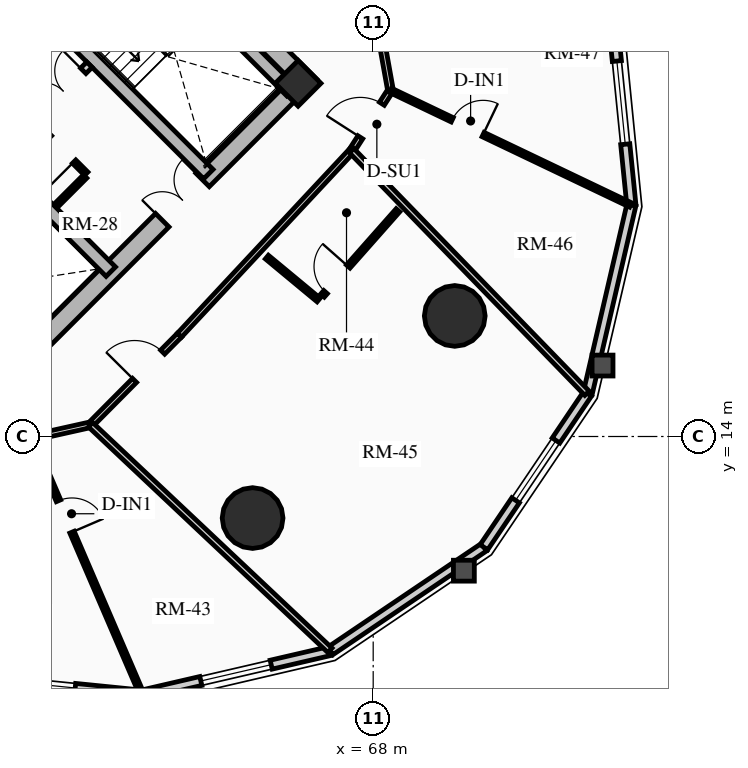
"""IFC4 building model, lengths in metres.
Left out: names, types, materials, properties, quantities, classifications, styles, units other than length and angle.
Written with IfcOpenShell. Run it as: python <this file> out.ifc"""

import sys

from ifc_helpers import new_model, si_unit, direction, frame, frame_2d, origin, origin_2d, place, context, subcontext, project, spatial, rectangle, circle, extrude, source, transform, mapped, element, fill, save


model = new_model("IFC4")
c1 = context("Model", 3, precision=1e-05, world=origin(), true_north=direction((0.0, 1.0)))
c2 = subcontext(c1, "Body", "Model", "MODEL_VIEW")
j1 = project(units=[si_unit("LENGTHUNIT", "METRE"), si_unit("PLANEANGLEUNIT", "RADIAN")], contexts=[c1])
p1 = place(None, origin())
s1 = spatial("IfcSite", under=j1, at=p1, CompositionType="ELEMENT")
p2 = place(p1, origin())
s2 = spatial("IfcBuilding", under=s1, at=p2, CompositionType="ELEMENT")
p3 = place(p2, frame((0.0, 0.0, 36.55)))
s3 = spatial("IfcBuildingStorey", under=s2, at=p3, CompositionType="ELEMENT", Elevation=36.55)
p4 = place(p3, frame((66.339, 23.227, 0.0), z_axis=(0.0, 0.0, 1.0), x_axis=(-0.707106781187, 0.707106781187, 0.0)))
e1 = element("IfcWall", 1, at=p4, inside=s3, PredefinedType="SHEAR", context=c2, shape_type="SweptSolid", body=[
    extrude(rectangle(XDim=14.3, YDim=0.5, at=frame_2d((7.15, 0.0))), origin(), (0.0, 0.0, 1.0), 2.91),
])
p5 = place(p3, frame((58.596, 15.838, 0.0), z_axis=(0.0, 0.0, 1.0), x_axis=(0.707106781187, 0.707106781187, 0.0)))
e2 = element("IfcWall", 2, at=p5, inside=s3, PredefinedType="SHEAR", context=c2, shape_type="SweptSolid", body=[
    extrude(rectangle(XDim=10.7, YDim=0.5, at=frame_2d((5.35, 0.0))), origin(), (0.0, 0.0, 1.0), 2.91),
])
m1 = source(origin(), c2, "Body", "SweptSolid", [
    extrude(rectangle(XDim=1.5, YDim=2.02, at=frame_2d((0.75, 1.01))), frame((0.0, 0.26, 0.0), z_axis=(0.0, -1.0, 0.0), x_axis=(1.0, 0.0, 0.0)), (0.0, 0.0, 1.0), 0.52),
])
p6 = place(p5, frame((5.45, 0.0, 0.0)))
e3 = element("IfcOpeningElement", 3, at=p6, cuts=e2, PredefinedType="OPENING", context=c2, shape_type="MappedRepresentation", body=[
    mapped(m1, transform((0.0, 0.0, 0.0), x_axis=(1.0, 0.0, 0.0), y_axis=(0.0, 1.0, 0.0), z_axis=(0.0, 0.0, 1.0), scale=1.0)),
])
p7 = place(p3, frame((61.096, 18.338, 0.0), z_axis=(0.0, 0.0, 1.0), x_axis=(-0.707106781187, 0.707106781187, 0.0)))
e4 = element("IfcWall", 4, at=p7, inside=s3, PredefinedType="SHEAR", context=c2, shape_type="SweptSolid", body=[
    extrude(rectangle(XDim=13.8, YDim=0.35, at=frame_2d((6.9, 0.0))), origin(), (0.0, 0.0, 1.0), 2.91),
])
m2 = source(origin(), c2, "Body", "SweptSolid", [
    extrude(rectangle(XDim=1.1, YDim=2.015, at=frame_2d((0.55, 1.007))), frame((0.0, 0.185, 0.0), z_axis=(0.0, -1.0, 0.0), x_axis=(1.0, 0.0, 0.0)), (0.0, 0.0, 1.0), 0.37),
])
p8 = place(p7, frame((4.9, 0.0, 0.0)))
e5 = element("IfcOpeningElement", 5, at=p8, cuts=e4, PredefinedType="OPENING", context=c2, shape_type="MappedRepresentation", body=[
    mapped(m2, transform((0.0, 0.0, 0.0), x_axis=(1.0, 0.0, 0.0), y_axis=(0.0, 1.0, 0.0), z_axis=(0.0, 0.0, 1.0), scale=1.0)),
])
m3 = source(origin(), c2, "Body", "SweptSolid", [
    extrude(rectangle(XDim=1.15, YDim=2.02, at=frame_2d((0.575, 1.01))), frame((0.0, 0.185, 0.0), z_axis=(0.0, -1.0, 0.0), x_axis=(1.0, 0.0, 0.0)), (0.0, 0.0, 1.0), 0.37),
])
p9 = place(p7, frame((7.32, 0.0, 0.0)))
e6 = element("IfcOpeningElement", 6, at=p9, cuts=e4, PredefinedType="OPENING", context=c2, shape_type="MappedRepresentation", body=[
    mapped(m3, transform((0.0, 0.0, 0.0), x_axis=(1.0, 0.0, 0.0), y_axis=(0.0, 1.0, 0.0), z_axis=(0.0, 0.0, 1.0), scale=1.0)),
])
p10 = place(p3, frame((63.662, 20.904, 0.0), z_axis=(0.0, 0.0, 1.0), x_axis=(-0.707106781187, 0.707106781187, 0.0)))
e7 = element("IfcWall", 7, at=p10, inside=s3, PredefinedType="SHEAR", context=c2, shape_type="SweptSolid", body=[
    extrude(rectangle(XDim=13.8, YDim=0.35, at=frame_2d((6.9, 0.0))), origin(), (0.0, 0.0, 1.0), 2.91),
])
p11 = place(p10, frame((10.025, 0.0, 0.0)))
e8 = element("IfcOpeningElement", 8, at=p11, cuts=e7, PredefinedType="OPENING", context=c2, shape_type="MappedRepresentation", body=[
    mapped(m2, transform((0.0, 0.0, 0.0), x_axis=(1.0, 0.0, 0.0), y_axis=(0.0, 1.0, 0.0), z_axis=(0.0, 0.0, 1.0), scale=1.0)),
])
p12 = place(p10, frame((12.025, 0.0, 0.0)))
e9 = element("IfcOpeningElement", 9, at=p12, cuts=e7, PredefinedType="OPENING", context=c2, shape_type="MappedRepresentation", body=[
    mapped(m2, transform((0.0, 0.0, 0.0), x_axis=(1.0, 0.0, 0.0), y_axis=(0.0, 1.0, 0.0), z_axis=(0.0, 0.0, 1.0), scale=1.0)),
])
p13 = place(p10, frame((5.33, 0.0, 0.0)))
e10 = element("IfcOpeningElement", 10, at=p13, cuts=e7, PredefinedType="OPENING", context=c2, shape_type="MappedRepresentation", body=[
    mapped(m3, transform((0.0, 0.0, 0.0), x_axis=(1.0, 0.0, 0.0), y_axis=(0.0, 1.0, 0.0), z_axis=(0.0, 0.0, 1.0), scale=1.0)),
])
p14 = place(p3, frame((65.847, 23.089, 0.0), z_axis=(0.0, 0.0, 1.0), x_axis=(-0.707106781187, 0.707106781187, 0.0)))
e11 = element("IfcWall", 11, at=p14, inside=s3, PredefinedType="SHEAR", context=c2, shape_type="SweptSolid", body=[
    extrude(rectangle(XDim=6.745, YDim=0.35, at=frame_2d((3.373, 0.0))), origin(), (0.0, 0.0, 1.0), 2.91),
])
p15 = place(p3, frame((66.024, 23.294, 0.0), z_axis=(0.0, 0.0, 1.0), x_axis=(0.707106781187, 0.707106781187, 0.0)))
e12 = element("IfcColumn", 12, at=p15, inside=s3, PredefinedType="COLUMN", context=c2, shape_type="SweptSolid", body=[
    extrude(rectangle(XDim=0.85, YDim=0.85, at=origin_2d()), origin(), (0.0, 0.0, 1.0), 2.91),
])
for number, where, z_axis, x_axis in (
    (13, (64.827, 11.854, 0.0), (0.0, 0.0, 1.0), (1.0, 0.0, 0.0)),
    (14, (70.146, 17.173, 0.0), (0.0, 0.0, 1.0), (1.0, 0.0, 0.0)),
):
    element("IfcColumn", number, at=place(p3, frame(where, z_axis=z_axis, x_axis=x_axis)), inside=s3, PredefinedType="USERDEFINED", context=c2, shape_type="SweptSolid", body=[
        extrude(circle(Radius=0.8, at=origin_2d()), origin(), (0.0, 0.0, 1.0), 2.91),
    ])
p16 = place(p3, frame((61.91, 7.206, 0.0), z_axis=(0.0, 0.0, 1.0), x_axis=(-0.994968263437, 0.100190592135, 0.0)))
e15 = element("IfcWall", 15, at=p16, inside=s3, PredefinedType="SOLIDWALL", context=c2, shape_type="SweptSolid", body=[
    extrude(rectangle(XDim=5.419, YDim=0.24, at=frame_2d((2.71, 0.0))), origin(), (0.0, 0.0, 1.0), 2.073),
])
m4 = source(origin(), c2, "Body", "SweptSolid", [
    extrude(rectangle(XDim=1.9, YDim=1.35, at=frame_2d((0.95, 0.675))), frame((0.0, 0.13, 0.0), z_axis=(0.0, -1.0, 0.0), x_axis=(1.0, 0.0, 0.0)), (0.0, 0.0, 1.0), 0.26),
])
p17 = place(p16, frame((1.76, 0.0, 0.65)))
e16 = element("IfcOpeningElement", 16, at=p17, cuts=e15, PredefinedType="OPENING", context=c2, shape_type="MappedRepresentation", body=[
    mapped(m4, transform((0.0, 0.0, 0.0), x_axis=(1.0, 0.0, 0.0), y_axis=(0.0, 1.0, 0.0), z_axis=(0.0, 0.0, 1.0), scale=1.0)),
])
p18 = place(p3, frame((66.871, 8.356, 0.0), z_axis=(0.0, 0.0, 1.0), x_axis=(-0.974167686491, -0.22582585901, 0.0)))
e17 = element("IfcWall", 17, at=p18, inside=s3, PredefinedType="SOLIDWALL", context=c2, shape_type="SweptSolid", body=[
    extrude(rectangle(XDim=5.092, YDim=0.24, at=frame_2d((2.546, 0.0))), origin(), (0.0, 0.0, 1.0), 2.073),
])
p19 = place(p18, frame((1.596, 0.0, 0.65)))
e18 = element("IfcOpeningElement", 18, at=p19, cuts=e17, PredefinedType="OPENING", context=c2, shape_type="MappedRepresentation", body=[
    mapped(m4, transform((0.0, 0.0, 0.0), x_axis=(1.0, 0.0, 0.0), y_axis=(0.0, 1.0, 0.0), z_axis=(0.0, 0.0, 1.0), scale=1.0)),
])
p20 = place(p3, frame((70.914, 11.086, 0.0), z_axis=(0.0, 0.0, 1.0), x_axis=(-0.828748297084, -0.559621532896, 0.0)))
e19 = element("IfcWall", 19, at=p20, inside=s3, PredefinedType="SOLIDWALL", context=c2, shape_type="SweptSolid", body=[
    extrude(rectangle(XDim=4.879, YDim=0.24, at=frame_2d((2.439, 0.0))), origin(), (0.0, 0.0, 1.0), 2.073),
])
p21 = place(p3, frame((73.644, 15.129, 0.0), z_axis=(0.0, 0.0, 1.0), x_axis=(-0.559621532896, -0.828748297084, 0.0)))
e20 = element("IfcWall", 20, at=p21, inside=s3, PredefinedType="SOLIDWALL", context=c2, shape_type="SweptSolid", body=[
    extrude(rectangle(XDim=4.879, YDim=0.24, at=frame_2d((2.439, 0.0))), origin(), (0.0, 0.0, 1.0), 2.073),
])
p22 = place(p21, frame((1.489, 0.0, 0.65)))
e21 = element("IfcOpeningElement", 21, at=p22, cuts=e20, PredefinedType="OPENING", context=c2, shape_type="MappedRepresentation", body=[
    mapped(m4, transform((0.0, 0.0, 0.0), x_axis=(1.0, 0.0, 0.0), y_axis=(0.0, 1.0, 0.0), z_axis=(0.0, 0.0, 1.0), scale=1.0)),
])
p23 = place(p3, frame((74.794, 20.09, 0.0), z_axis=(0.0, 0.0, 1.0), x_axis=(-0.22582585901, -0.974167686491, 0.0)))
e22 = element("IfcWall", 22, at=p23, inside=s3, PredefinedType="SOLIDWALL", context=c2, shape_type="SweptSolid", body=[
    extrude(rectangle(XDim=5.092, YDim=0.24, at=frame_2d((2.546, 0.0))), origin(), (0.0, 0.0, 1.0), 2.073),
])
p24 = place(p3, frame((74.251, 25.482, 0.0), z_axis=(0.0, 0.0, 1.0), x_axis=(0.100190592135, -0.994968263437, 0.0)))
e23 = element("IfcWall", 23, at=p24, inside=s3, PredefinedType="SOLIDWALL", context=c2, shape_type="SweptSolid", body=[
    extrude(rectangle(XDim=5.419, YDim=0.24, at=frame_2d((2.71, 0.0))), origin(), (0.0, 0.0, 1.0), 2.073),
])
m5 = source(origin(), c2, "Body", "SweptSolid", [
    extrude(rectangle(XDim=2.2, YDim=1.35, at=frame_2d((1.1, 0.675))), frame((0.0, 0.13, 0.0), z_axis=(0.0, -1.0, 0.0), x_axis=(1.0, 0.0, 0.0)), (0.0, 0.0, 1.0), 0.26),
])
p25 = place(p24, frame((1.61, 0.0, 0.65)))
e24 = element("IfcOpeningElement", 24, at=p25, cuts=e23, PredefinedType="OPENING", context=c2, shape_type="MappedRepresentation", body=[
    mapped(m5, transform((0.0, 0.0, 0.0), x_axis=(1.0, 0.0, 0.0), y_axis=(0.0, 1.0, 0.0), z_axis=(0.0, 0.0, 1.0), scale=1.0)),
])
p26 = place(p3, frame((58.214, 21.467, 0.0), z_axis=(0.0, 0.0, 1.0), x_axis=(0.707106781187, 0.707106781187, 0.0)))
e25 = element("IfcWall", 25, at=p26, inside=s3, PredefinedType="PARTITIONING", context=c2, shape_type="SweptSolid", body=[
    extrude(rectangle(XDim=3.28, YDim=0.2, at=frame_2d((1.64, 0.0))), origin(), (0.0, 0.0, 1.0), 2.635),
])
m6 = source(origin(), c2, "Body", "SweptSolid", [
    extrude(rectangle(XDim=1.5, YDim=2.02, at=frame_2d((0.75, 1.01))), frame((0.0, 0.11, 0.0), z_axis=(0.0, -1.0, 0.0), x_axis=(1.0, 0.0, 0.0)), (0.0, 0.0, 1.0), 0.22),
])
p27 = place(p26, frame((1.55, 0.0, 0.0)))
e26 = element("IfcOpeningElement", 26, at=p27, cuts=e25, PredefinedType="OPENING", context=c2, shape_type="MappedRepresentation", body=[
    mapped(m6, transform((0.0, 0.0, 0.0), x_axis=(1.0, 0.0, 0.0), y_axis=(0.0, 1.0, 0.0), z_axis=(0.0, 0.0, 1.0), scale=1.0)),
])
p28 = place(p3, frame((60.448, 20.915, 0.0), z_axis=(0.0, 0.0, 1.0), x_axis=(-0.707106781187, 0.707106781187, 0.0)))
e27 = element("IfcWall", 27, at=p28, inside=s3, PredefinedType="PARTITIONING", context=c2, shape_type="SweptSolid", body=[
    extrude(rectangle(XDim=1.87, YDim=0.125, at=frame_2d((0.935, 0.0))), origin(), (0.0, 0.0, 1.0), 2.635),
])
m7 = source(origin(), c2, "Body", "SweptSolid", [
    extrude(rectangle(XDim=0.9, YDim=2.005, at=frame_2d((0.45, 1.002))), frame((0.0, 0.073, 0.0), z_axis=(0.0, -1.0, 0.0), x_axis=(1.0, 0.0, 0.0)), (0.0, 0.0, 1.0), 0.145),
])
p29 = place(p28, frame((0.45, 0.0, 0.0)))
e28 = element("IfcOpeningElement", 28, at=p29, cuts=e27, PredefinedType="OPENING", context=c2, shape_type="MappedRepresentation", body=[
    mapped(m7, transform((0.0, 0.0, 0.0), x_axis=(1.0, 0.0, 0.0), y_axis=(0.0, 1.0, 0.0), z_axis=(0.0, 0.0, 1.0), scale=1.0)),
])
p30 = place(p3, frame((59.643, 20.066, 0.0), z_axis=(0.0, 0.0, 1.0), x_axis=(0.707106781187, 0.707106781187, 0.0)))
e29 = element("IfcWall", 29, at=p30, inside=s3, PredefinedType="PARTITIONING", context=c2, shape_type="SweptSolid", body=[
    extrude(rectangle(XDim=1.1, YDim=0.125, at=frame_2d((0.55, 0.0))), origin(), (0.0, 0.0, 1.0), 2.635),
])
p31 = place(p3, frame((59.008, 13.963, 0.0), z_axis=(0.0, 0.0, 1.0), x_axis=(0.976020856791, 0.21767702476, 0.0)))
e30 = element("IfcWall", 30, at=p31, inside=s3, PredefinedType="PARTITIONING", context=c2, shape_type="SweptSolid", body=[
    extrude(rectangle(XDim=1.593, YDim=0.15, at=frame_2d((0.796, 0.0))), origin(), (0.0, 0.0, 1.0), 2.205),
])
p32 = place(p3, frame((60.562, 14.31, 0.0), z_axis=(0.0, 0.0, 1.0), x_axis=(0.704566236161, 0.709638230975, 0.0)))
e31 = element("IfcWall", 31, at=p32, inside=s3, PredefinedType="PARTITIONING", context=c2, shape_type="SweptSolid", body=[
    extrude(rectangle(XDim=3.321, YDim=0.15, at=frame_2d((1.661, 0.0))), origin(), (0.0, 0.0, 1.0), 2.159),
])
m8 = source(origin(), c2, "Body", "SweptSolid", [
    extrude(rectangle(XDim=1.05, YDim=2.015, at=frame_2d((0.525, 1.007))), frame((0.0, 0.085, 0.0), z_axis=(0.0, -1.0, 0.0), x_axis=(1.0, 0.0, 0.0)), (0.0, 0.0, 1.0), 0.17),
])
p33 = place(p32, frame((1.643, 0.0, 0.0)))
e32 = element("IfcOpeningElement", 32, at=p33, cuts=e31, PredefinedType="OPENING", context=c2, shape_type="MappedRepresentation", body=[
    mapped(m8, transform((0.0, 0.0, 0.0), x_axis=(1.0, 0.0, 0.0), y_axis=(0.0, 1.0, 0.0), z_axis=(0.0, 0.0, 1.0), scale=1.0)),
])
p34 = place(p3, frame((62.903, 16.667, 0.0), z_axis=(0.0, 0.0, 1.0), x_axis=(0.682371947497, 0.731005147225, 0.0)))
e33 = element("IfcWall", 33, at=p34, inside=s3, PredefinedType="PARTITIONING", context=c2, shape_type="SweptSolid", body=[
    extrude(rectangle(XDim=6.642, YDim=0.15, at=frame_2d((3.321, 0.0))), origin(), (0.0, 0.0, 1.0), 2.159),
])
p35 = place(p3, frame((67.435, 21.521, 0.0), z_axis=(0.0, 0.0, 1.0), x_axis=(0.540777197838, 0.841165870859, 0.0)))
e34 = element("IfcWall", 34, at=p35, inside=s3, PredefinedType="PARTITIONING", context=c2, shape_type="SweptSolid", body=[
    extrude(rectangle(XDim=1.888, YDim=0.15, at=frame_2d((0.944, 0.0))), origin(), (0.0, 0.0, 1.0), 2.205),
])
p36 = place(p35, frame((0.419, 0.0, 0.0)))
e35 = element("IfcOpeningElement", 35, at=p36, cuts=e34, PredefinedType="OPENING", context=c2, shape_type="MappedRepresentation", body=[
    mapped(m8, transform((0.0, 0.0, 0.0), x_axis=(1.0, 0.0, 0.0), y_axis=(0.0, 1.0, 0.0), z_axis=(0.0, 0.0, 1.0), scale=1.0)),
])
p37 = place(p3, frame((68.456, 23.11, 0.0), z_axis=(0.0, 0.0, 1.0), x_axis=(-0.1772522795, 0.984165448191, 0.0)))
e36 = element("IfcWall", 36, at=p37, inside=s3, PredefinedType="PARTITIONING", context=c2, shape_type="SweptSolid", body=[
    extrude(rectangle(XDim=1.382, YDim=0.15, at=frame_2d((0.691, 0.0))), origin(), (0.0, 0.0, 1.0), 2.159),
])
p38 = place(p3, frame((60.562, 14.31, 0.0), z_axis=(0.0, 0.0, 1.0), x_axis=(0.727781661561, -0.685808904211, 0.0)))
e37 = element("IfcWall", 37, at=p38, inside=s3, PredefinedType="PARTITIONING", context=c2, shape_type="SweptSolid", body=[
    extrude(rectangle(XDim=8.655, YDim=0.16, at=frame_2d((4.328, 0.0))), origin(), (0.0, 0.0, 1.0), 2.073),
])
p39 = place(p3, frame((67.435, 21.521, 0.0), z_axis=(0.0, 0.0, 1.0), x_axis=(0.6962628802, -0.717786877601, 0.0)))
e38 = element("IfcWall", 38, at=p39, inside=s3, PredefinedType="PARTITIONING", context=c2, shape_type="SweptSolid", body=[
    extrude(rectangle(XDim=8.893, YDim=0.16, at=frame_2d((4.446, 0.0))), origin(), (0.0, 0.0, 1.0), 2.073),
])
p40 = place(p3, frame((59.008, 13.963, 0.0), z_axis=(0.0, 0.0, 1.0), x_axis=(0.395256697593, -0.918570706592, 0.0)))
e39 = element("IfcWall", 39, at=p40, inside=s3, PredefinedType="PARTITIONING", context=c2, shape_type="SweptSolid", body=[
    extrude(rectangle(XDim=7.334, YDim=0.125, at=frame_2d((3.667, 0.0))), origin(), (0.0, 0.0, 1.0), 2.073),
])
p41 = place(p40, frame((1.8, 0.0, 0.0)))
e40 = element("IfcOpeningElement", 40, at=p41, cuts=e39, PredefinedType="OPENING", context=c2, shape_type="MappedRepresentation", body=[
    mapped(m7, transform((0.0, 0.0, 0.0), x_axis=(1.0, 0.0, 0.0), y_axis=(0.0, 1.0, 0.0), z_axis=(0.0, 0.0, 1.0), scale=1.0)),
])
p42 = place(p3, frame((65.202, 18.721, 0.0), z_axis=(0.0, 0.0, 1.0), x_axis=(0.769814202386, -0.638268042287, 0.0)))
e41 = element("IfcWall", 41, at=p42, inside=s3, PredefinedType="PARTITIONING", context=c2, shape_type="SweptSolid", body=[
    extrude(rectangle(XDim=1.769, YDim=0.125, at=frame_2d((0.884, 0.0))), origin(), (0.0, 0.0, 1.0), 2.635),
])
p43 = place(p3, frame((66.667, 17.709, 0.0), z_axis=(0.0, 0.0, 1.0), x_axis=(0.662510581678, 0.749052554341, 0.0)))
e42 = element("IfcWall", 42, at=p43, inside=s3, PredefinedType="PARTITIONING", context=c2, shape_type="SweptSolid", body=[
    extrude(rectangle(XDim=2.996, YDim=0.125, at=frame_2d((1.498, 0.0))), origin(), (0.0, 0.0, 1.0), 2.159),
])
p44 = place(p43, frame((0.12, 0.0, 0.0)))
e43 = element("IfcOpeningElement", 43, at=p44, cuts=e42, PredefinedType="OPENING", context=c2, shape_type="MappedRepresentation", body=[
    mapped(m7, transform((0.0, 0.0, 0.0), x_axis=(1.0, 0.0, 0.0), y_axis=(0.0, 1.0, 0.0), z_axis=(0.0, 0.0, 1.0), scale=1.0)),
])
p45 = place(p3, frame((68.456, 23.11, 0.0), z_axis=(0.0, 0.0, 1.0), x_axis=(0.902430819297, -0.430834790125, 0.0)))
e44 = element("IfcWall", 44, at=p45, inside=s3, PredefinedType="PARTITIONING", context=c2, shape_type="SweptSolid", body=[
    extrude(rectangle(XDim=7.002, YDim=0.125, at=frame_2d((3.501, 0.0))), origin(), (0.0, 0.0, 1.0), 2.073),
])
p46 = place(p45, frame((1.8, 0.0, 0.0)))
e45 = element("IfcOpeningElement", 45, at=p46, cuts=e44, PredefinedType="OPENING", context=c2, shape_type="MappedRepresentation", body=[
    mapped(m7, transform((0.0, 0.0, 0.0), x_axis=(1.0, 0.0, 0.0), y_axis=(0.0, 1.0, 0.0), z_axis=(0.0, 0.0, 1.0), scale=1.0)),
])
m9 = source(origin(), c2, "Body", "SweptSolid", [
    extrude(rectangle(XDim=1.9, YDim=1.35, at=frame_2d((0.95, 0.675))), frame((0.0, 0.03, 0.0), z_axis=(0.0, -1.0, 0.0), x_axis=(1.0, 0.0, 0.0)), (0.0, 0.0, 1.0), 0.06),
])
p47 = place(p17, origin())
e46 = element("IfcWindow", 46, at=p47, inside=s3, PartitioningType="DOUBLE_PANEL_VERTICAL", PredefinedType="WINDOW", context=c2, shape_type="MappedRepresentation", body=[
    mapped(m9, transform((0.0, 0.0, 0.0), x_axis=(1.0, 0.0, 0.0), y_axis=(0.0, 1.0, 0.0), z_axis=(0.0, 0.0, 1.0), scale=1.0)),
])
fill(e16, e46)
p48 = place(p19, origin())
e47 = element("IfcWindow", 47, at=p48, inside=s3, PartitioningType="DOUBLE_PANEL_VERTICAL", PredefinedType="WINDOW", context=c2, shape_type="MappedRepresentation", body=[
    mapped(m9, transform((0.0, 0.0, 0.0), x_axis=(1.0, 0.0, 0.0), y_axis=(0.0, 1.0, 0.0), z_axis=(0.0, 0.0, 1.0), scale=1.0)),
])
fill(e18, e47)
p49 = place(p22, origin())
e48 = element("IfcWindow", 48, at=p49, inside=s3, PartitioningType="DOUBLE_PANEL_VERTICAL", PredefinedType="WINDOW", context=c2, shape_type="MappedRepresentation", body=[
    mapped(m9, transform((0.0, 0.0, 0.0), x_axis=(1.0, 0.0, 0.0), y_axis=(0.0, 1.0, 0.0), z_axis=(0.0, 0.0, 1.0), scale=1.0)),
])
fill(e21, e48)
m10 = source(origin(), c2, "Body", "SweptSolid", [
    extrude(rectangle(XDim=2.2, YDim=1.35, at=frame_2d((1.1, 0.675))), frame((0.0, 0.03, 0.0), z_axis=(0.0, -1.0, 0.0), x_axis=(1.0, 0.0, 0.0)), (0.0, 0.0, 1.0), 0.06),
])
p50 = place(p25, origin())
e49 = element("IfcWindow", 49, at=p50, inside=s3, PartitioningType="DOUBLE_PANEL_VERTICAL", PredefinedType="WINDOW", context=c2, shape_type="MappedRepresentation", body=[
    mapped(m10, transform((0.0, 0.0, 0.0), x_axis=(1.0, 0.0, 0.0), y_axis=(0.0, 1.0, 0.0), z_axis=(0.0, 0.0, 1.0), scale=1.0)),
])
fill(e24, e49)
m11 = source(origin(), c2, "Body", "SweptSolid", [
    extrude(rectangle(XDim=1.5, YDim=2.02, at=frame_2d((0.75, 1.01))), frame((0.0, 0.025, 0.0), z_axis=(0.0, -1.0, 0.0), x_axis=(1.0, 0.0, 0.0)), (0.0, 0.0, 1.0), 0.05),
])
p51 = place(p6, origin())
e50 = element("IfcDoor", 50, at=p51, inside=s3, OperationType="DOUBLE_DOOR_SINGLE_SWING", PredefinedType="DOOR", context=c2, shape_type="MappedRepresentation", body=[
    mapped(m11, transform((0.0, 0.0, 0.0), x_axis=(1.0, 0.0, 0.0), y_axis=(0.0, 1.0, 0.0), z_axis=(0.0, 0.0, 1.0), scale=1.0)),
])
fill(e3, e50)
p52 = place(p27, origin())
e51 = element("IfcDoor", 51, at=p52, inside=s3, OperationType="DOUBLE_DOOR_SINGLE_SWING", PredefinedType="DOOR", context=c2, shape_type="MappedRepresentation", body=[
    mapped(m11, transform((0.0, 0.0, 0.0), x_axis=(1.0, 0.0, 0.0), y_axis=(0.0, 1.0, 0.0), z_axis=(0.0, 0.0, 1.0), scale=1.0)),
])
fill(e26, e51)
m12 = source(origin(), c2, "Body", "SweptSolid", [
    extrude(rectangle(XDim=0.9, YDim=2.005, at=frame_2d((0.45, 1.002))), frame((0.0, 0.025, 0.0), z_axis=(0.0, -1.0, 0.0), x_axis=(1.0, 0.0, 0.0)), (0.0, 0.0, 1.0), 0.05),
])
p53 = place(p29, origin())
e52 = element("IfcDoor", 52, at=p53, inside=s3, OperationType="SINGLE_SWING_LEFT", PredefinedType="DOOR", context=c2, shape_type="MappedRepresentation", body=[
    mapped(m12, transform((0.0, 0.0, 0.0), x_axis=(1.0, 0.0, 0.0), y_axis=(0.0, 1.0, 0.0), z_axis=(0.0, 0.0, 1.0), scale=1.0)),
])
fill(e28, e52)
p54 = place(p41, origin())
e53 = element("IfcDoor", 53, at=p54, inside=s3, OperationType="SINGLE_SWING_RIGHT", PredefinedType="DOOR", context=c2, shape_type="MappedRepresentation", body=[
    mapped(m12, transform((0.0, 0.0, 0.0), x_axis=(1.0, 0.0, 0.0), y_axis=(0.0, 1.0, 0.0), z_axis=(0.0, 0.0, 1.0), scale=1.0)),
])
fill(e40, e53)
m13 = source(origin(), c2, "Body", "SweptSolid", [
    extrude(rectangle(XDim=1.05, YDim=2.015, at=frame_2d((0.525, 1.007))), frame((0.0, 0.025, 0.0), z_axis=(0.0, -1.0, 0.0), x_axis=(1.0, 0.0, 0.0)), (0.0, 0.0, 1.0), 0.05),
])
p55 = place(p33, origin())
e54 = element("IfcDoor", 54, at=p55, inside=s3, OperationType="SINGLE_SWING_LEFT", PredefinedType="DOOR", context=c2, shape_type="MappedRepresentation", body=[
    mapped(m13, transform((0.0, 0.0, 0.0), x_axis=(1.0, 0.0, 0.0), y_axis=(0.0, 1.0, 0.0), z_axis=(0.0, 0.0, 1.0), scale=1.0)),
])
fill(e32, e54)
p56 = place(p44, origin())
e55 = element("IfcDoor", 55, at=p56, inside=s3, OperationType="SINGLE_SWING_RIGHT", PredefinedType="DOOR", context=c2, shape_type="MappedRepresentation", body=[
    mapped(m12, transform((0.0, 0.0, 0.0), x_axis=(1.0, 0.0, 0.0), y_axis=(0.0, 1.0, 0.0), z_axis=(0.0, 0.0, 1.0), scale=1.0)),
])
fill(e43, e55)
p57 = place(p36, origin())
e56 = element("IfcDoor", 56, at=p57, inside=s3, OperationType="SINGLE_SWING_LEFT", PredefinedType="DOOR", context=c2, shape_type="MappedRepresentation", body=[
    mapped(m13, transform((0.0, 0.0, 0.0), x_axis=(1.0, 0.0, 0.0), y_axis=(0.0, 1.0, 0.0), z_axis=(0.0, 0.0, 1.0), scale=1.0)),
])
fill(e35, e56)
p58 = place(p46, origin())
e57 = element("IfcDoor", 57, at=p58, inside=s3, OperationType="SINGLE_SWING_RIGHT", PredefinedType="DOOR", context=c2, shape_type="MappedRepresentation", body=[
    mapped(m12, transform((0.0, 0.0, 0.0), x_axis=(1.0, 0.0, 0.0), y_axis=(0.0, 1.0, 0.0), z_axis=(0.0, 0.0, 1.0), scale=1.0)),
])
fill(e45, e57)
save(model, sys.argv[1])
